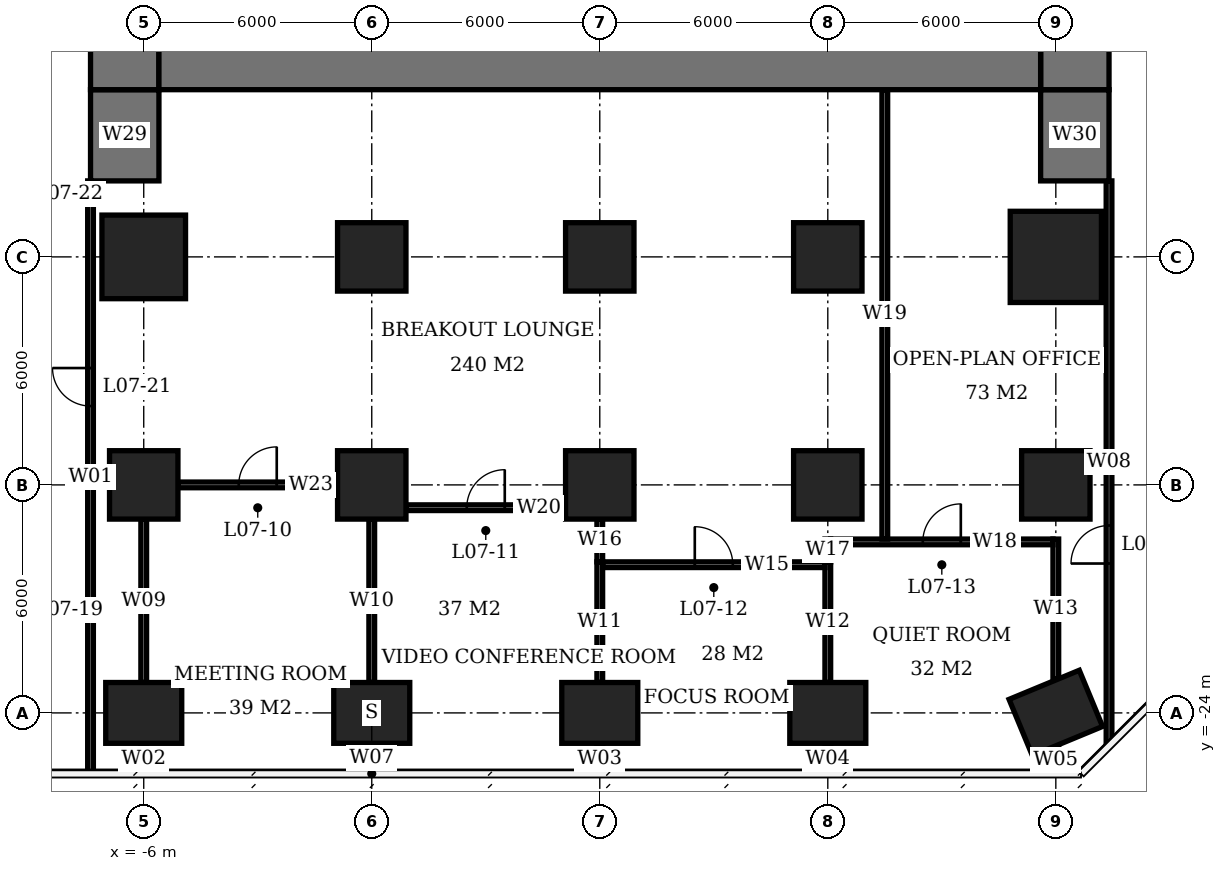
"""IFC4 building model, lengths in metres.
Left out: names, types, materials, properties, quantities, classifications, styles, units other than length and angle.
Written with IfcOpenShell. Run it as: python <this file> out.ifc"""

import sys

from ifc_helpers import new_model, si_unit, direction, frame, frame_2d, origin, origin_2d, place, context, subcontext, project, spatial, rectangle, extrude, element, fill, save


model = new_model("IFC4")
c1 = context("Model", 3, precision=1e-05, world=origin(), true_north=direction((0.0, 1.0)))
c2 = subcontext(c1, "Body", "Model", "MODEL_VIEW")
j1 = project(units=[si_unit("LENGTHUNIT", "METRE"), si_unit("PLANEANGLEUNIT", "RADIAN")], contexts=[c1])
p1 = place(None, origin())
s1 = spatial("IfcSite", under=j1, at=p1, CompositionType="ELEMENT")
p2 = place(p1, origin())
s2 = spatial("IfcBuilding", under=s1, at=p2, CompositionType="ELEMENT")
p3 = place(p2, frame((0.0, 0.0, 33.8)))
s3 = spatial("IfcBuildingStorey", under=s2, at=p3, CompositionType="ELEMENT", Elevation=33.8)
p4 = place(p3, frame((-6.0, -24.0, 0.0), z_axis=(0.0, 0.0, 1.0), x_axis=(1.0, 0.0, 0.0)))
e1 = element("IfcColumn", 1, at=p4, inside=s3, PredefinedType="COLUMN", context=c2, shape_type="SweptSolid", body=[
    extrude(rectangle(XDim=2.0, YDim=1.6, at=origin_2d()), origin(), (0.0, 0.0, 1.0), 3.9),
])
p5 = place(p3, frame((-6.0, -18.0, 0.0), z_axis=(0.0, 0.0, 1.0), x_axis=(1.0, 0.0, 0.0)))
e2 = element("IfcColumn", 2, at=p5, inside=s3, PredefinedType="COLUMN", context=c2, shape_type="SweptSolid", body=[
    extrude(rectangle(XDim=1.8, YDim=1.8, at=origin_2d()), origin(), (0.0, 0.0, 1.0), 3.9),
])
p6 = place(p3, frame((-6.0, -12.0, 0.0), z_axis=(0.0, 0.0, 1.0), x_axis=(1.0, 0.0, 0.0)))
e3 = element("IfcColumn", 3, at=p6, inside=s3, PredefinedType="COLUMN", context=c2, shape_type="SweptSolid", body=[
    extrude(rectangle(XDim=2.2, YDim=2.2, at=origin_2d()), origin(), (0.0, 0.0, 1.0), 3.9),
])
p7 = place(p3, frame((0.0, -24.0, 0.0), z_axis=(0.0, 0.0, 1.0), x_axis=(1.0, 0.0, 0.0)))
e4 = element("IfcColumn", 4, at=p7, inside=s3, PredefinedType="COLUMN", context=c2, shape_type="SweptSolid", body=[
    extrude(rectangle(XDim=2.0, YDim=1.6, at=origin_2d()), origin(), (0.0, 0.0, 1.0), 3.9),
])
for number, where, z_axis, x_axis in (
    (5, (0.0, -18.0, 0.0), (0.0, 0.0, 1.0), (1.0, 0.0, 0.0)),
    (6, (0.0, -12.0, 0.0), (0.0, 0.0, 1.0), (1.0, 0.0, 0.0)),
):
    element("IfcColumn", number, at=place(p3, frame(where, z_axis=z_axis, x_axis=x_axis)), inside=s3, PredefinedType="COLUMN", context=c2, shape_type="SweptSolid", body=[
        extrude(rectangle(XDim=1.8, YDim=1.8, at=origin_2d()), origin(), (0.0, 0.0, 1.0), 3.9),
    ])
p8 = place(p3, frame((6.0, -24.0, 0.0), z_axis=(0.0, 0.0, 1.0), x_axis=(1.0, 0.0, 0.0)))
e7 = element("IfcColumn", 7, at=p8, inside=s3, PredefinedType="COLUMN", context=c2, shape_type="SweptSolid", body=[
    extrude(rectangle(XDim=2.0, YDim=1.6, at=origin_2d()), origin(), (0.0, 0.0, 1.0), 3.9),
])
for number, where, z_axis, x_axis in (
    (8, (6.0, -18.0, 0.0), (0.0, 0.0, 1.0), (1.0, 0.0, 0.0)),
    (9, (6.0, -12.0, 0.0), (0.0, 0.0, 1.0), (1.0, 0.0, 0.0)),
):
    element("IfcColumn", number, at=place(p3, frame(where, z_axis=z_axis, x_axis=x_axis)), inside=s3, PredefinedType="COLUMN", context=c2, shape_type="SweptSolid", body=[
        extrude(rectangle(XDim=1.8, YDim=1.8, at=origin_2d()), origin(), (0.0, 0.0, 1.0), 3.9),
    ])
p9 = place(p3, frame((12.0, -24.0, 0.0), z_axis=(0.0, 0.0, 1.0), x_axis=(1.0, 0.0, 0.0)))
e10 = element("IfcColumn", 10, at=p9, inside=s3, PredefinedType="COLUMN", context=c2, shape_type="SweptSolid", body=[
    extrude(rectangle(XDim=2.0, YDim=1.6, at=origin_2d()), origin(), (0.0, 0.0, 1.0), 3.9),
])
for number, where, z_axis, x_axis in (
    (11, (12.0, -18.0, 0.0), (0.0, 0.0, 1.0), (1.0, 0.0, 0.0)),
    (12, (12.0, -12.0, 0.0), (0.0, 0.0, 1.0), (1.0, 0.0, 0.0)),
):
    element("IfcColumn", number, at=place(p3, frame(where, z_axis=z_axis, x_axis=x_axis)), inside=s3, PredefinedType="COLUMN", context=c2, shape_type="SweptSolid", body=[
        extrude(rectangle(XDim=1.8, YDim=1.8, at=origin_2d()), origin(), (0.0, 0.0, 1.0), 3.9),
    ])
p10 = place(p3, frame((18.0, -24.0, 0.0), z_axis=(0.0, 0.0, 1.0), x_axis=(-0.923879532511, -0.382683432365, 0.0)))
e13 = element("IfcColumn", 13, at=p10, inside=s3, PredefinedType="COLUMN", context=c2, shape_type="SweptSolid", body=[
    extrude(rectangle(XDim=2.0, YDim=1.6, at=origin_2d()), origin(), (0.0, 0.0, 1.0), 3.9),
])
p11 = place(p3, frame((18.0, -18.0, 0.0), z_axis=(0.0, 0.0, 1.0), x_axis=(1.0, 0.0, 0.0)))
e14 = element("IfcColumn", 14, at=p11, inside=s3, PredefinedType="COLUMN", context=c2, shape_type="SweptSolid", body=[
    extrude(rectangle(XDim=1.8, YDim=1.8, at=origin_2d()), origin(), (0.0, 0.0, 1.0), 3.9),
])
p12 = place(p3, frame((18.0, -12.0, 0.0), z_axis=(0.0, 0.0, 1.0), x_axis=(1.0, 0.0, 0.0)))
e15 = element("IfcColumn", 15, at=p12, inside=s3, PredefinedType="COLUMN", context=c2, shape_type="SweptSolid", body=[
    extrude(rectangle(XDim=2.4, YDim=2.4, at=origin_2d()), origin(), (0.0, 0.0, 1.0), 3.9),
])
p13 = place(p3, frame((-5.6, -6.6, 0.0), z_axis=(0.0, 0.0, 1.0), x_axis=(1.0, 0.0, 0.0)))
e16 = element("IfcWall", 16, at=p13, inside=s3, PredefinedType="SHEAR", context=c2, shape_type="SweptSolid", body=[
    extrude(rectangle(XDim=23.2, YDim=2.0, at=frame_2d((11.6, 0.0))), origin(), (0.0, 0.0, 1.0), 3.9),
])
p14 = place(p3, frame((-6.5, -7.6, 0.0), z_axis=(0.0, 0.0, 1.0), x_axis=(0.0, 1.0, 0.0)))
e17 = element("IfcWall", 17, at=p14, inside=s3, PredefinedType="SHEAR", context=c2, shape_type="SweptSolid", body=[
    extrude(rectangle(XDim=21.2, YDim=1.8, at=frame_2d((10.6, 0.0))), origin(), (0.0, 0.0, 1.0), 3.9),
])
p15 = place(p14, frame((7.8, 0.0, 0.0)))
e18 = element("IfcOpeningElement", 18, at=p15, cuts=e17, PredefinedType="OPENING", context=c2, shape_type="SweptSolid", body=[
    extrude(rectangle(XDim=1.8, YDim=2.4, at=frame_2d((0.9, 1.2))), frame((0.0, 0.91, 0.0), z_axis=(0.0, -1.0, 0.0), x_axis=(1.0, 0.0, 0.0)), (0.0, 0.0, 1.0), 1.82),
])
p16 = place(p3, frame((18.5, -7.6, 0.0), z_axis=(0.0, 0.0, 1.0), x_axis=(0.0, 1.0, 0.0)))
e19 = element("IfcWall", 19, at=p16, inside=s3, PredefinedType="SHEAR", context=c2, shape_type="SweptSolid", body=[
    extrude(rectangle(XDim=21.2, YDim=1.8, at=frame_2d((10.6, 0.0))), origin(), (0.0, 0.0, 1.0), 3.9),
])
p17 = place(p16, frame((9.2, 0.0, 0.0)))
e20 = element("IfcOpeningElement", 20, at=p17, cuts=e19, PredefinedType="OPENING", context=c2, shape_type="SweptSolid", body=[
    extrude(rectangle(XDim=1.8, YDim=2.4, at=frame_2d((0.9, 1.2))), frame((0.0, 0.91, 0.0), z_axis=(0.0, -1.0, 0.0), x_axis=(1.0, 0.0, 0.0)), (0.0, 0.0, 1.0), 1.82),
])
for number, where, z_axis, x_axis in (
    (21, (-6.5, -10.0, 0.0), (0.0, 0.0, 1.0), (0.0, 1.0, 0.0)),
    (22, (18.5, -10.0, 0.0), (0.0, 0.0, 1.0), (0.0, 1.0, 0.0)),
):
    element("IfcWall", number, at=place(p3, frame(where, z_axis=z_axis, x_axis=x_axis)), inside=s3, PredefinedType="SHEAR", context=c2, shape_type="SweptSolid", body=[
        extrude(rectangle(XDim=2.4, YDim=1.8, at=frame_2d((1.2, 0.0))), origin(), (0.0, 0.0, 1.0), 3.9),
    ])
p18 = place(p3, frame((6.075, -20.1, 0.0), z_axis=(0.0, 0.0, 1.0), x_axis=(1.0, 0.0, 0.0)))
e23 = element("IfcWall", 23, at=p18, inside=s3, PredefinedType="PARTITIONING", context=c2, shape_type="SweptSolid", body=[
    extrude(rectangle(XDim=5.85, YDim=0.15, at=frame_2d((2.925, 0.0))), origin(), (0.0, 0.0, 1.0), 3.65),
])
p19 = place(p18, frame((2.425, 0.0, 0.0)))
e24 = element("IfcOpeningElement", 24, at=p19, cuts=e23, PredefinedType="OPENING", context=c2, shape_type="SweptSolid", body=[
    extrude(rectangle(XDim=1.0, YDim=2.1, at=frame_2d((0.5, 1.05))), frame((0.0, 0.085, 0.0), z_axis=(0.0, -1.0, 0.0), x_axis=(1.0, 0.0, 0.0)), (0.0, 0.0, 1.0), 0.17),
])
p20 = place(p3, frame((12.075, -19.5, 0.0), z_axis=(0.0, 0.0, 1.0), x_axis=(1.0, 0.0, 0.0)))
e25 = element("IfcWall", 25, at=p20, inside=s3, PredefinedType="PARTITIONING", context=c2, shape_type="SweptSolid", body=[
    extrude(rectangle(XDim=5.85, YDim=0.15, at=frame_2d((2.925, 0.0))), origin(), (0.0, 0.0, 1.0), 3.65),
])
p21 = place(p20, frame((2.425, 0.0, 0.0)))
e26 = element("IfcOpeningElement", 26, at=p21, cuts=e25, PredefinedType="OPENING", context=c2, shape_type="SweptSolid", body=[
    extrude(rectangle(XDim=1.0, YDim=2.1, at=frame_2d((0.5, 1.05))), frame((0.0, 0.085, 0.0), z_axis=(0.0, -1.0, 0.0), x_axis=(1.0, 0.0, 0.0)), (0.0, 0.0, 1.0), 0.17),
])
p22 = place(p3, frame((0.9, -18.6, 0.0), z_axis=(0.0, 0.0, 1.0), x_axis=(1.0, 0.0, 0.0)))
e27 = element("IfcWall", 27, at=p22, inside=s3, PredefinedType="PARTITIONING", context=c2, shape_type="SweptSolid", body=[
    extrude(rectangle(XDim=4.2, YDim=0.15, at=frame_2d((2.1, 0.0))), origin(), (0.0, 0.0, 1.0), 3.65),
])
p23 = place(p22, frame((1.6, 0.0, 0.0)))
e28 = element("IfcOpeningElement", 28, at=p23, cuts=e27, PredefinedType="OPENING", context=c2, shape_type="SweptSolid", body=[
    extrude(rectangle(XDim=1.0, YDim=2.1, at=frame_2d((0.5, 1.05))), frame((0.0, 0.085, 0.0), z_axis=(0.0, -1.0, 0.0), x_axis=(1.0, 0.0, 0.0)), (0.0, 0.0, 1.0), 0.17),
])
p24 = place(p3, frame((-5.1, -18.0, 0.0), z_axis=(0.0, 0.0, 1.0), x_axis=(1.0, 0.0, 0.0)))
e29 = element("IfcWall", 29, at=p24, inside=s3, PredefinedType="PARTITIONING", context=c2, shape_type="SweptSolid", body=[
    extrude(rectangle(XDim=4.2, YDim=0.15, at=frame_2d((2.1, 0.0))), origin(), (0.0, 0.0, 1.0), 3.65),
])
p25 = place(p24, frame((1.6, 0.0, 0.0)))
e30 = element("IfcOpeningElement", 30, at=p25, cuts=e29, PredefinedType="OPENING", context=c2, shape_type="SweptSolid", body=[
    extrude(rectangle(XDim=1.0, YDim=2.1, at=frame_2d((0.5, 1.05))), frame((0.0, 0.085, 0.0), z_axis=(0.0, -1.0, 0.0), x_axis=(1.0, 0.0, 0.0)), (0.0, 0.0, 1.0), 0.17),
])
p26 = place(p3, frame((-6.0, -25.6, 0.0), z_axis=(0.0, 0.0, 1.0), x_axis=(0.0, 1.0, 0.0)))
e31 = element("IfcWall", 31, at=p26, inside=s3, PredefinedType="PARTITIONING", context=c2, shape_type="SweptSolid", body=[
    extrude(rectangle(XDim=0.8, YDim=0.15, at=frame_2d((0.4, 0.0))), origin(), (0.0, 0.0, 1.0), 3.65),
])
p27 = place(p3, frame((-6.0, -23.2, 0.0), z_axis=(0.0, 0.0, 1.0), x_axis=(0.0, 1.0, 0.0)))
e32 = element("IfcWall", 32, at=p27, inside=s3, PredefinedType="PARTITIONING", context=c2, shape_type="SweptSolid", body=[
    extrude(rectangle(XDim=4.3, YDim=0.15, at=frame_2d((2.15, 0.0))), origin(), (0.0, 0.0, 1.0), 3.65),
])
p28 = place(p3, frame((0.0, -25.55, 0.0), z_axis=(0.0, 0.0, 1.0), x_axis=(0.0, 1.0, 0.0)))
e33 = element("IfcWall", 33, at=p28, inside=s3, PredefinedType="PARTITIONING", context=c2, shape_type="SweptSolid", body=[
    extrude(rectangle(XDim=0.75, YDim=0.15, at=frame_2d((0.375, 0.0))), origin(), (0.0, 0.0, 1.0), 3.65),
])
p29 = place(p3, frame((0.0, -23.2, 0.0), z_axis=(0.0, 0.0, 1.0), x_axis=(0.0, 1.0, 0.0)))
e34 = element("IfcWall", 34, at=p29, inside=s3, PredefinedType="PARTITIONING", context=c2, shape_type="SweptSolid", body=[
    extrude(rectangle(XDim=4.3, YDim=0.15, at=frame_2d((2.15, 0.0))), origin(), (0.0, 0.0, 1.0), 3.65),
])
p30 = place(p3, frame((6.0, -25.6, 0.0), z_axis=(0.0, 0.0, 1.0), x_axis=(0.0, 1.0, 0.0)))
e35 = element("IfcWall", 35, at=p30, inside=s3, PredefinedType="PARTITIONING", context=c2, shape_type="SweptSolid", body=[
    extrude(rectangle(XDim=0.8, YDim=0.15, at=frame_2d((0.4, 0.0))), origin(), (0.0, 0.0, 1.0), 3.65),
])
p31 = place(p3, frame((6.0, -23.2, 0.0), z_axis=(0.0, 0.0, 1.0), x_axis=(0.0, 1.0, 0.0)))
e36 = element("IfcWall", 36, at=p31, inside=s3, PredefinedType="PARTITIONING", context=c2, shape_type="SweptSolid", body=[
    extrude(rectangle(XDim=3.175, YDim=0.15, at=frame_2d((1.587, 0.0))), origin(), (0.0, 0.0, 1.0), 3.65),
])
p32 = place(p3, frame((6.0, -20.025, 0.0), z_axis=(0.0, 0.0, 1.0), x_axis=(0.0, 1.0, 0.0)))
e37 = element("IfcWall", 37, at=p32, inside=s3, PredefinedType="PARTITIONING", context=c2, shape_type="SweptSolid", body=[
    extrude(rectangle(XDim=1.125, YDim=0.15, at=frame_2d((0.562, 0.0))), origin(), (0.0, 0.0, 1.0), 3.65),
])
p33 = place(p3, frame((12.0, -25.6, 0.0), z_axis=(0.0, 0.0, 1.0), x_axis=(0.0, 1.0, 0.0)))
e38 = element("IfcWall", 38, at=p33, inside=s3, PredefinedType="PARTITIONING", context=c2, shape_type="SweptSolid", body=[
    extrude(rectangle(XDim=0.8, YDim=0.15, at=frame_2d((0.4, 0.0))), origin(), (0.0, 0.0, 1.0), 3.65),
])
p34 = place(p3, frame((12.0, -23.2, 0.0), z_axis=(0.0, 0.0, 1.0), x_axis=(0.0, 1.0, 0.0)))
e39 = element("IfcWall", 39, at=p34, inside=s3, PredefinedType="PARTITIONING", context=c2, shape_type="SweptSolid", body=[
    extrude(rectangle(XDim=3.175, YDim=0.15, at=frame_2d((1.587, 0.0))), origin(), (0.0, 0.0, 1.0), 3.65),
])
p35 = place(p3, frame((12.0, -20.025, 0.0), z_axis=(0.0, 0.0, 1.0), x_axis=(0.0, 1.0, 0.0)))
e40 = element("IfcWall", 40, at=p35, inside=s3, PredefinedType="PARTITIONING", context=c2, shape_type="SweptSolid", body=[
    extrude(rectangle(XDim=0.6, YDim=0.15, at=frame_2d((0.3, 0.0))), origin(), (0.0, 0.0, 1.0), 3.65),
])
p36 = place(p3, frame((18.0, -25.6, 0.0), z_axis=(0.0, 0.0, 1.0), x_axis=(0.0, 1.0, 0.0)))
e41 = element("IfcWall", 41, at=p36, inside=s3, PredefinedType="PARTITIONING", context=c2, shape_type="SweptSolid", body=[
    extrude(rectangle(XDim=0.703, YDim=0.15, at=frame_2d((0.352, 0.0))), origin(), (0.0, 0.0, 1.0), 3.65),
])
p37 = place(p3, frame((18.0, -23.103, 0.0), z_axis=(0.0, 0.0, 1.0), x_axis=(0.0, 1.0, 0.0)))
e42 = element("IfcWall", 42, at=p37, inside=s3, PredefinedType="PARTITIONING", context=c2, shape_type="SweptSolid", body=[
    extrude(rectangle(XDim=3.678, YDim=0.15, at=frame_2d((1.839, 0.0))), origin(), (0.0, 0.0, 1.0), 3.65),
])
p38 = place(p3, frame((-7.4, -25.6, 0.0), z_axis=(0.0, 0.0, 1.0), x_axis=(0.0, 1.0, 0.0)))
e43 = element("IfcWall", 43, at=p38, inside=s3, PredefinedType="PARTITIONING", context=c2, shape_type="SweptSolid", body=[
    extrude(rectangle(XDim=15.6, YDim=0.15, at=frame_2d((7.8, 0.0))), origin(), (0.0, 0.0, 1.0), 3.65),
])
p39 = place(p38, frame((9.675, 0.0, 0.0)))
e44 = element("IfcOpeningElement", 44, at=p39, cuts=e43, PredefinedType="OPENING", context=c2, shape_type="SweptSolid", body=[
    extrude(rectangle(XDim=1.0, YDim=2.1, at=frame_2d((0.5, 1.05))), frame((0.0, 0.085, 0.0), z_axis=(0.0, -1.0, 0.0), x_axis=(1.0, 0.0, 0.0)), (0.0, 0.0, 1.0), 0.17),
])
p40 = place(p3, frame((13.5, -19.425, 0.0), z_axis=(0.0, 0.0, 1.0), x_axis=(0.0, 1.0, 0.0)))
e45 = element("IfcWall", 45, at=p40, inside=s3, PredefinedType="PARTITIONING", context=c2, shape_type="SweptSolid", body=[
    extrude(rectangle(XDim=11.825, YDim=0.15, at=frame_2d((5.913, 0.0))), origin(), (0.0, 0.0, 1.0), 3.65),
])
p41 = place(p3, frame((19.4, -24.771, 0.0), z_axis=(0.0, 0.0, 1.0), x_axis=(0.0, 1.0, 0.0)))
e46 = element("IfcWall", 46, at=p41, inside=s3, PredefinedType="PARTITIONING", context=c2, shape_type="SweptSolid", body=[
    extrude(rectangle(XDim=14.771, YDim=0.15, at=frame_2d((7.385, 0.0))), origin(), (0.0, 0.0, 1.0), 3.65),
])
p42 = place(p41, frame((4.702, 0.0, 0.0)))
e47 = element("IfcOpeningElement", 47, at=p42, cuts=e46, PredefinedType="OPENING", context=c2, shape_type="SweptSolid", body=[
    extrude(rectangle(XDim=1.0, YDim=2.1, at=frame_2d((0.5, 1.05))), frame((0.0, 0.085, 0.0), z_axis=(0.0, -1.0, 0.0), x_axis=(1.0, 0.0, 0.0)), (0.0, 0.0, 1.0), 0.17),
])
p43 = place(p25, origin())
e48 = element("IfcDoor", 48, at=p43, inside=s3, OperationType="SINGLE_SWING_RIGHT", PredefinedType="DOOR", context=c2, shape_type="SweptSolid", body=[
    extrude(rectangle(XDim=1.0, YDim=2.1, at=frame_2d((0.5, 1.05))), frame((0.0, 0.025, 0.0), z_axis=(0.0, -1.0, 0.0), x_axis=(1.0, 0.0, 0.0)), (0.0, 0.0, 1.0), 0.05),
])
fill(e30, e48)
p44 = place(p23, origin())
e49 = element("IfcDoor", 49, at=p44, inside=s3, OperationType="SINGLE_SWING_RIGHT", PredefinedType="DOOR", context=c2, shape_type="SweptSolid", body=[
    extrude(rectangle(XDim=1.0, YDim=2.1, at=frame_2d((0.5, 1.05))), frame((0.0, 0.025, 0.0), z_axis=(0.0, -1.0, 0.0), x_axis=(1.0, 0.0, 0.0)), (0.0, 0.0, 1.0), 0.05),
])
fill(e28, e49)
p45 = place(p19, origin())
e50 = element("IfcDoor", 50, at=p45, inside=s3, OperationType="SINGLE_SWING_LEFT", PredefinedType="DOOR", context=c2, shape_type="SweptSolid", body=[
    extrude(rectangle(XDim=1.0, YDim=2.1, at=frame_2d((0.5, 1.05))), frame((0.0, 0.025, 0.0), z_axis=(0.0, -1.0, 0.0), x_axis=(1.0, 0.0, 0.0)), (0.0, 0.0, 1.0), 0.05),
])
fill(e24, e50)
p46 = place(p21, origin())
e51 = element("IfcDoor", 51, at=p46, inside=s3, OperationType="SINGLE_SWING_RIGHT", PredefinedType="DOOR", context=c2, shape_type="SweptSolid", body=[
    extrude(rectangle(XDim=1.0, YDim=2.1, at=frame_2d((0.5, 1.05))), frame((0.0, 0.025, 0.0), z_axis=(0.0, -1.0, 0.0), x_axis=(1.0, 0.0, 0.0)), (0.0, 0.0, 1.0), 0.05),
])
fill(e26, e51)
p47 = place(p42, origin())
e52 = element("IfcDoor", 52, at=p47, inside=s3, OperationType="SINGLE_SWING_LEFT", PredefinedType="DOOR", context=c2, shape_type="SweptSolid", body=[
    extrude(rectangle(XDim=1.0, YDim=2.1, at=frame_2d((0.5, 1.05))), frame((0.0, 0.025, 0.0), z_axis=(0.0, -1.0, 0.0), x_axis=(1.0, 0.0, 0.0)), (0.0, 0.0, 1.0), 0.05),
])
fill(e47, e52)
p48 = place(p39, origin())
e53 = element("IfcDoor", 53, at=p48, inside=s3, OperationType="SINGLE_SWING_RIGHT", PredefinedType="DOOR", context=c2, shape_type="SweptSolid", body=[
    extrude(rectangle(XDim=1.0, YDim=2.1, at=frame_2d((0.5, 1.05))), frame((0.0, 0.025, 0.0), z_axis=(0.0, -1.0, 0.0), x_axis=(1.0, 0.0, 0.0)), (0.0, 0.0, 1.0), 0.05),
])
fill(e44, e53)
save(model, sys.argv[1])
